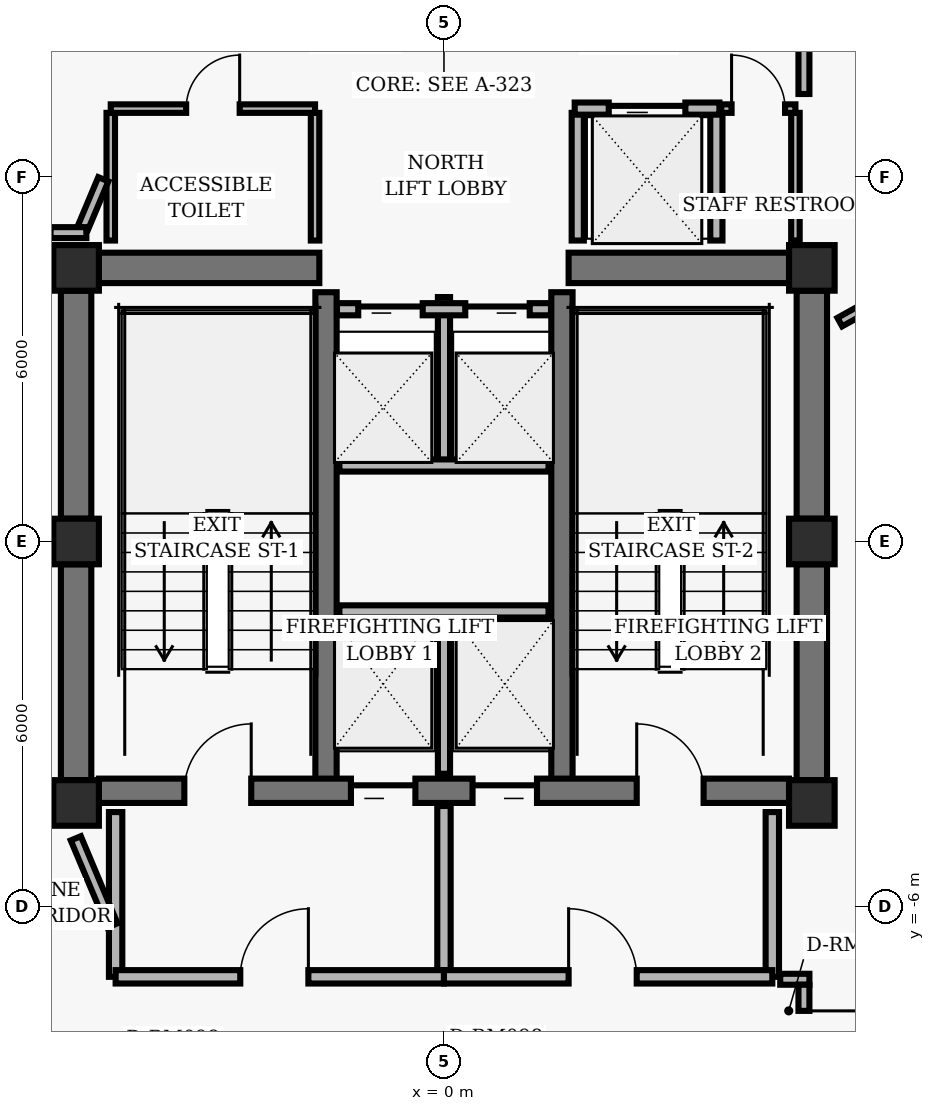
"""IFC4 building model, lengths in metres.
Left out: names, types, materials, properties, quantities, classifications, styles, units other than length and angle.
Written with IfcOpenShell. Run it as: python <this file> out.ifc"""

import sys

from ifc_helpers import new_model, si_unit, direction, frame, frame_2d, origin, origin_2d, place, context, subcontext, project, spatial, rectangle, hollow_rectangle, extrude, element, fill, save


model = new_model("IFC4")
c1 = context("Model", 3, precision=1e-05, world=origin(), true_north=direction((0.0, 1.0)))
c2 = subcontext(c1, "Body", "Model", "MODEL_VIEW")
j1 = project(units=[si_unit("LENGTHUNIT", "METRE"), si_unit("PLANEANGLEUNIT", "RADIAN")], contexts=[c1])
p1 = place(None, origin())
s1 = spatial("IfcSite", under=j1, at=p1, CompositionType="ELEMENT")
p2 = place(p1, origin())
s2 = spatial("IfcBuilding", under=s1, at=p2, CompositionType="ELEMENT")
p3 = place(p2, frame((0.0, 0.0, 175.36)))
s3 = spatial("IfcBuildingStorey", under=s2, at=p3, CompositionType="ELEMENT", Elevation=175.36)
for number, where, z_axis, x_axis in (
    (1, (-6.05, 4.5, 0.0), (0.0, 0.0, 1.0), (1.0, 0.0, 0.0)),
    (2, (6.05, 4.5, 0.0), (0.0, 0.0, 1.0), (1.0, 0.0, 0.0)),
    (3, (-6.05, 0.0, 0.0), (0.0, 0.0, 1.0), (1.0, 0.0, 0.0)),
    (4, (6.05, 0.0, 0.0), (0.0, 0.0, 1.0), (1.0, 0.0, 0.0)),
    (5, (-6.05, -4.3, 0.0), (0.0, 0.0, 1.0), (1.0, 0.0, 0.0)),
    (6, (6.05, -4.3, 0.0), (0.0, 0.0, 1.0), (1.0, 0.0, 0.0)),
):
    element("IfcColumn", number, at=place(p3, frame(where, z_axis=z_axis, x_axis=x_axis)), inside=s3, PredefinedType="COLUMN", context=c2, shape_type="SweptSolid", body=[
        extrude(hollow_rectangle(XDim=0.75, YDim=0.75, WallThickness=0.05, InnerFilletRadius=0.02, OuterFilletRadius=0.04, at=origin_2d()), origin(), (0.0, 0.0, 1.0), 3.04),
    ])
p4 = place(p3, frame((-6.05, 0.375, 0.0), z_axis=(0.0, 0.0, 1.0), x_axis=(0.0, 1.0, 0.0)))
e7 = element("IfcWall", 7, at=p4, inside=s3, PredefinedType="SHEAR", context=c2, shape_type="SweptSolid", body=[
    extrude(rectangle(XDim=3.75, YDim=0.5, at=frame_2d((1.875, 0.0))), origin(), (0.0, 0.0, 1.0), 2.798),
])
p5 = place(p3, frame((-6.05, -3.925, 0.0), z_axis=(0.0, 0.0, 1.0), x_axis=(0.0, 1.0, 0.0)))
e8 = element("IfcWall", 8, at=p5, inside=s3, PredefinedType="SHEAR", context=c2, shape_type="SweptSolid", body=[
    extrude(rectangle(XDim=3.55, YDim=0.5, at=frame_2d((1.775, 0.0))), origin(), (0.0, 0.0, 1.0), 2.798),
])
p6 = place(p3, frame((6.05, 0.375, 0.0), z_axis=(0.0, 0.0, 1.0), x_axis=(0.0, 1.0, 0.0)))
e9 = element("IfcWall", 9, at=p6, inside=s3, PredefinedType="SHEAR", context=c2, shape_type="SweptSolid", body=[
    extrude(rectangle(XDim=3.75, YDim=0.5, at=frame_2d((1.875, 0.0))), origin(), (0.0, 0.0, 1.0), 2.798),
])
p7 = place(p3, frame((6.05, -3.925, 0.0), z_axis=(0.0, 0.0, 1.0), x_axis=(0.0, 1.0, 0.0)))
e10 = element("IfcWall", 10, at=p7, inside=s3, PredefinedType="SHEAR", context=c2, shape_type="SweptSolid", body=[
    extrude(rectangle(XDim=3.55, YDim=0.5, at=frame_2d((1.775, 0.0))), origin(), (0.0, 0.0, 1.0), 2.798),
])
for number, where, z_axis, x_axis in (
    (11, (-1.94, -4.1, 0.0), (0.0, 0.0, 1.0), (0.0, 1.0, 0.0)),
    (12, (1.94, -4.1, 0.0), (0.0, 0.0, 1.0), (0.0, 1.0, 0.0)),
):
    element("IfcWall", number, at=place(p3, frame(where, z_axis=z_axis, x_axis=x_axis)), inside=s3, PredefinedType="SHEAR", context=c2, shape_type="SweptSolid", body=[
        extrude(rectangle(XDim=8.2, YDim=0.35, at=frame_2d((4.1, 0.0))), origin(), (0.0, 0.0, 1.0), 2.798),
    ])
p8 = place(p3, frame((-5.675, -4.1, 0.0), z_axis=(0.0, 0.0, 1.0), x_axis=(1.0, 0.0, 0.0)))
e13 = element("IfcWall", 13, at=p8, inside=s3, PredefinedType="SHEAR", context=c2, shape_type="SweptSolid", body=[
    extrude(rectangle(XDim=11.35, YDim=0.4, at=frame_2d((5.675, 0.0))), origin(), (0.0, 0.0, 1.0), 2.798),
])
p9 = place(p8, frame((1.405, 0.0, 0.0)))
e14 = element("IfcOpeningElement", 14, at=p9, cuts=e13, PredefinedType="OPENING", context=c2, shape_type="SweptSolid", body=[
    extrude(rectangle(XDim=1.1, YDim=2.04, at=frame_2d((0.55, 1.02))), frame((0.0, 0.21, 0.0), z_axis=(0.0, -1.0, 0.0), x_axis=(1.0, 0.0, 0.0)), (0.0, 0.0, 1.0), 0.42),
])
p10 = place(p8, frame((8.845, 0.0, 0.0)))
e15 = element("IfcOpeningElement", 15, at=p10, cuts=e13, PredefinedType="OPENING", context=c2, shape_type="SweptSolid", body=[
    extrude(rectangle(XDim=1.1, YDim=2.04, at=frame_2d((0.55, 1.02))), frame((0.0, 0.21, 0.0), z_axis=(0.0, -1.0, 0.0), x_axis=(1.0, 0.0, 0.0)), (0.0, 0.0, 1.0), 0.42),
])
p11 = place(p8, frame((4.145, 0.0, 0.0)))
e16 = element("IfcOpeningElement", 16, at=p11, cuts=e13, PredefinedType="OPENING", context=c2, shape_type="SweptSolid", body=[
    extrude(rectangle(XDim=1.06, YDim=2.04, at=frame_2d((0.53, 1.02))), frame((0.0, 0.21, 0.0), z_axis=(0.0, -1.0, 0.0), x_axis=(1.0, 0.0, 0.0)), (0.0, 0.0, 1.0), 0.42),
])
p12 = place(p8, frame((6.145, 0.0, 0.0)))
e17 = element("IfcOpeningElement", 17, at=p12, cuts=e13, PredefinedType="OPENING", context=c2, shape_type="SweptSolid", body=[
    extrude(rectangle(XDim=1.06, YDim=2.04, at=frame_2d((0.53, 1.02))), frame((0.0, 0.21, 0.0), z_axis=(0.0, -1.0, 0.0), x_axis=(1.0, 0.0, 0.0)), (0.0, 0.0, 1.0), 0.42),
])
for number, where, z_axis, x_axis in (
    (18, (-5.675, 4.5, 0.0), (0.0, 0.0, 1.0), (1.0, 0.0, 0.0)),
    (19, (2.05, 4.5, 0.0), (0.0, 0.0, 1.0), (1.0, 0.0, 0.0)),
):
    element("IfcWall", number, at=place(p3, frame(where, z_axis=z_axis, x_axis=x_axis)), inside=s3, PredefinedType="SHEAR", context=c2, shape_type="SweptSolid", body=[
        extrude(rectangle(XDim=3.625, YDim=0.5, at=frame_2d((1.812, 0.0))), origin(), (0.0, 0.0, 1.0), 2.798),
    ])
p13 = place(p3, frame((0.0, -3.82, 0.0), z_axis=(0.0, 0.0, 1.0), x_axis=(0.0, 1.0, 0.0)))
e20 = element("IfcWall", 20, at=p13, inside=s3, PredefinedType="PARTITIONING", context=c2, shape_type="SweptSolid", body=[
    extrude(rectangle(XDim=2.67, YDim=0.2, at=frame_2d((1.335, 0.0))), origin(), (0.0, 0.0, 1.0), 2.773),
])
p14 = place(p3, frame((-1.72, -1.15, 0.0), z_axis=(0.0, 0.0, 1.0), x_axis=(1.0, 0.0, 0.0)))
e21 = element("IfcWall", 21, at=p14, inside=s3, PredefinedType="PARTITIONING", context=c2, shape_type="SweptSolid", body=[
    extrude(rectangle(XDim=3.44, YDim=0.2, at=frame_2d((1.72, 0.0))), origin(), (0.0, 0.0, 1.0), 2.773),
])
for number, where, z_axis, x_axis in (
    (22, (-5.4, -7.16, 0.0), (0.0, 0.0, 1.0), (0.0, 1.0, 0.0)),
    (23, (5.4, -7.16, 0.0), (0.0, 0.0, 1.0), (0.0, 1.0, 0.0)),
):
    element("IfcWall", number, at=place(p3, frame(where, z_axis=z_axis, x_axis=x_axis)), inside=s3, PredefinedType="PARTITIONING", context=c2, shape_type="SweptSolid", body=[
        extrude(rectangle(XDim=2.71, YDim=0.22, at=frame_2d((1.355, 0.0))), origin(), (0.0, 0.0, 1.0), 2.773),
    ])
p15 = place(p3, frame((0.0, -7.16, 0.0), z_axis=(0.0, 0.0, 1.0), x_axis=(0.0, 1.0, 0.0)))
e24 = element("IfcWall", 24, at=p15, inside=s3, PredefinedType="PARTITIONING", context=c2, shape_type="SweptSolid", body=[
    extrude(rectangle(XDim=2.81, YDim=0.22, at=frame_2d((1.405, 0.0))), origin(), (0.0, 0.0, 1.0), 2.773),
])
p16 = place(p3, frame((-5.4, -7.16, 0.0), z_axis=(0.0, 0.0, 1.0), x_axis=(1.0, 0.0, 0.0)))
e25 = element("IfcWall", 25, at=p16, inside=s3, PredefinedType="PARTITIONING", context=c2, shape_type="SweptSolid", body=[
    extrude(rectangle(XDim=5.4, YDim=0.22, at=frame_2d((2.7, 0.0))), origin(), (0.0, 0.0, 1.0), 2.395),
])
p17 = place(p16, frame((2.05, 0.0, 0.0)))
e26 = element("IfcOpeningElement", 26, at=p17, cuts=e25, PredefinedType="OPENING", context=c2, shape_type="SweptSolid", body=[
    extrude(rectangle(XDim=1.12, YDim=2.02, at=frame_2d((0.56, 1.01))), frame((0.0, 0.12, 0.0), z_axis=(0.0, -1.0, 0.0), x_axis=(1.0, 0.0, 0.0)), (0.0, 0.0, 1.0), 0.24),
])
p18 = place(p3, frame((0.0, -7.16, 0.0), z_axis=(0.0, 0.0, 1.0), x_axis=(1.0, 0.0, 0.0)))
e27 = element("IfcWall", 27, at=p18, inside=s3, PredefinedType="PARTITIONING", context=c2, shape_type="SweptSolid", body=[
    extrude(rectangle(XDim=5.4, YDim=0.22, at=frame_2d((2.7, 0.0))), origin(), (0.0, 0.0, 1.0), 2.395),
])
p19 = place(p18, frame((2.05, 0.0, 0.0)))
e28 = element("IfcOpeningElement", 28, at=p19, cuts=e27, PredefinedType="OPENING", context=c2, shape_type="SweptSolid", body=[
    extrude(rectangle(XDim=1.12, YDim=2.02, at=frame_2d((0.56, 1.01))), frame((0.0, 0.12, 0.0), z_axis=(0.0, -1.0, 0.0), x_axis=(1.0, 0.0, 0.0)), (0.0, 0.0, 1.0), 0.24),
])
p20 = place(p3, frame((0.0, 1.25, 0.0), z_axis=(0.0, 0.0, 1.0), x_axis=(0.0, 1.0, 0.0)))
e29 = element("IfcWall", 29, at=p20, inside=s3, PredefinedType="PARTITIONING", context=c2, shape_type="SweptSolid", body=[
    extrude(rectangle(XDim=2.77, YDim=0.2, at=frame_2d((1.385, 0.0))), origin(), (0.0, 0.0, 1.0), 2.773),
])
p21 = place(p3, frame((-1.72, 1.25, 0.0), z_axis=(0.0, 0.0, 1.0), x_axis=(1.0, 0.0, 0.0)))
e30 = element("IfcWall", 30, at=p21, inside=s3, PredefinedType="PARTITIONING", context=c2, shape_type="SweptSolid", body=[
    extrude(rectangle(XDim=3.44, YDim=0.2, at=frame_2d((1.72, 0.0))), origin(), (0.0, 0.0, 1.0), 2.773),
])
p22 = place(p3, frame((-1.76, 3.82, 0.0), z_axis=(0.0, 0.0, 1.0), x_axis=(1.0, 0.0, 0.0)))
e31 = element("IfcWall", 31, at=p22, inside=s3, PredefinedType="PARTITIONING", context=c2, shape_type="SweptSolid", body=[
    extrude(rectangle(XDim=3.52, YDim=0.2, at=frame_2d((1.76, 0.0))), origin(), (0.0, 0.0, 1.0), 2.773),
])
p23 = place(p22, frame((0.35, 0.0, 0.0)))
e32 = element("IfcOpeningElement", 32, at=p23, cuts=e31, PredefinedType="OPENING", context=c2, shape_type="SweptSolid", body=[
    extrude(rectangle(XDim=1.06, YDim=2.04, at=frame_2d((0.53, 1.02))), frame((0.0, 0.11, 0.0), z_axis=(0.0, -1.0, 0.0), x_axis=(1.0, 0.0, 0.0)), (0.0, 0.0, 1.0), 0.22),
])
p24 = place(p22, frame((2.11, 0.0, 0.0)))
e33 = element("IfcOpeningElement", 33, at=p24, cuts=e31, PredefinedType="OPENING", context=c2, shape_type="SweptSolid", body=[
    extrude(rectangle(XDim=1.06, YDim=2.04, at=frame_2d((0.53, 1.02))), frame((0.0, 0.11, 0.0), z_axis=(0.0, -1.0, 0.0), x_axis=(1.0, 0.0, 0.0)), (0.0, 0.0, 1.0), 0.22),
])
for number, where, z_axis, x_axis in (
    (34, (2.2, 4.95, 0.0), (0.0, 0.0, 1.0), (0.0, 1.0, 0.0)),
    (35, (4.48, 4.95, 0.0), (0.0, 0.0, 1.0), (0.0, 1.0, 0.0)),
):
    element("IfcWall", number, at=place(p3, frame(where, z_axis=z_axis, x_axis=x_axis)), inside=s3, PredefinedType="PARTITIONING", context=c2, shape_type="SweptSolid", body=[
        extrude(rectangle(XDim=2.1, YDim=0.2, at=frame_2d((1.05, 0.0))), origin(), (0.0, 0.0, 1.0), 2.773),
    ])
p25 = place(p3, frame((2.15, 7.12, 0.0), z_axis=(0.0, 0.0, 1.0), x_axis=(1.0, 0.0, 0.0)))
e36 = element("IfcWall", 36, at=p25, inside=s3, PredefinedType="PARTITIONING", context=c2, shape_type="SweptSolid", body=[
    extrude(rectangle(XDim=2.38, YDim=0.2, at=frame_2d((1.19, 0.0))), origin(), (0.0, 0.0, 1.0), 2.773),
])
p26 = place(p25, frame((0.56, 0.0, 0.0)))
e37 = element("IfcOpeningElement", 37, at=p26, cuts=e36, PredefinedType="OPENING", context=c2, shape_type="SweptSolid", body=[
    extrude(rectangle(XDim=1.26, YDim=2.06, at=frame_2d((0.63, 1.03))), frame((0.0, 0.11, 0.0), z_axis=(0.0, -1.0, 0.0), x_axis=(1.0, 0.0, 0.0)), (0.0, 0.0, 1.0), 0.22),
])
for number, where, z_axis, x_axis in (
    (38, (-5.48, 4.95, 0.0), (0.0, 0.0, 1.0), (0.0, 1.0, 0.0)),
    (39, (-2.12, 4.95, 0.0), (0.0, 0.0, 1.0), (0.0, 1.0, 0.0)),
):
    element("IfcWall", number, at=place(p3, frame(where, z_axis=z_axis, x_axis=x_axis)), inside=s3, PredefinedType="PARTITIONING", context=c2, shape_type="SweptSolid", body=[
        extrude(rectangle(XDim=2.1, YDim=0.14, at=frame_2d((1.05, 0.0))), origin(), (0.0, 0.0, 1.0), 2.773),
    ])
p27 = place(p3, frame((-5.48, 7.12, 0.0), z_axis=(0.0, 0.0, 1.0), x_axis=(1.0, 0.0, 0.0)))
e40 = element("IfcWall", 40, at=p27, inside=s3, PredefinedType="PARTITIONING", context=c2, shape_type="SweptSolid", body=[
    extrude(rectangle(XDim=3.36, YDim=0.14, at=frame_2d((1.68, 0.0))), origin(), (0.0, 0.0, 1.0), 2.773),
])
p28 = place(p27, frame((1.24, 0.0, 0.0)))
e41 = element("IfcOpeningElement", 41, at=p28, cuts=e40, PredefinedType="OPENING", context=c2, shape_type="SweptSolid", body=[
    extrude(rectangle(XDim=0.88, YDim=2.02, at=frame_2d((0.44, 1.01))), frame((0.0, 0.08, 0.0), z_axis=(0.0, -1.0, 0.0), x_axis=(1.0, 0.0, 0.0)), (0.0, 0.0, 1.0), 0.16),
])
p29 = place(p3, frame((5.78, 4.95, 0.0), z_axis=(0.0, 0.0, 1.0), x_axis=(0.0, 1.0, 0.0)))
e42 = element("IfcWall", 42, at=p29, inside=s3, PredefinedType="PARTITIONING", context=c2, shape_type="SweptSolid", body=[
    extrude(rectangle(XDim=2.1, YDim=0.14, at=frame_2d((1.05, 0.0))), origin(), (0.0, 0.0, 1.0), 2.253),
])
p30 = place(p3, frame((4.56, 7.12, 0.0), z_axis=(0.0, 0.0, 1.0), x_axis=(1.0, 0.0, 0.0)))
e43 = element("IfcWall", 43, at=p30, inside=s3, PredefinedType="PARTITIONING", context=c2, shape_type="SweptSolid", body=[
    extrude(rectangle(XDim=1.22, YDim=0.14, at=frame_2d((0.61, 0.0))), origin(), (0.0, 0.0, 1.0), 2.773),
])
p31 = place(p30, frame((0.17, 0.0, 0.0)))
e44 = element("IfcOpeningElement", 44, at=p31, cuts=e43, PredefinedType="OPENING", context=c2, shape_type="SweptSolid", body=[
    extrude(rectangle(XDim=0.88, YDim=2.02, at=frame_2d((0.44, 1.01))), frame((0.0, 0.08, 0.0), z_axis=(0.0, -1.0, 0.0), x_axis=(1.0, 0.0, 0.0)), (0.0, 0.0, 1.0), 0.16),
])
p32 = place(p3, frame((5.92, 9.16, 0.0), z_axis=(0.0, 0.0, 1.0), x_axis=(0.0, -1.0, 0.0)))
e45 = element("IfcWall", 45, at=p32, inside=s3, PredefinedType="PARTITIONING", context=c2, shape_type="SweptSolid", body=[
    extrude(rectangle(XDim=1.8, YDim=0.18, at=frame_2d((0.9, 0.0))), origin(), (0.0, 0.0, 1.0), 2.253),
])
p33 = place(p3, frame((-5.602, 5.958, 0.0), z_axis=(0.0, 0.0, 1.0), x_axis=(-0.387588639363, -0.921832439566, 0.0)))
e46 = element("IfcWall", 46, at=p33, inside=s3, PredefinedType="PARTITIONING", context=c2, shape_type="SweptSolid", body=[
    extrude(rectangle(XDim=0.862, YDim=0.18, at=frame_2d((0.431, 0.0))), origin(), (0.0, 0.0, 1.0), 2.773),
])
p34 = place(p3, frame((-5.881, 5.08, 0.0), z_axis=(0.0, 0.0, 1.0), x_axis=(-1.0, 0.0, 0.0)))
e47 = element("IfcWall", 47, at=p34, inside=s3, PredefinedType="PARTITIONING", context=c2, shape_type="SweptSolid", body=[
    extrude(rectangle(XDim=0.589, YDim=0.18, at=frame_2d((0.294, 0.0))), origin(), (0.0, 0.0, 1.0), 2.773),
])
p35 = place(p3, frame((-6.055, -4.882, 0.0), z_axis=(0.0, 0.0, 1.0), x_axis=(0.387579540458, -0.921836265189, 0.0)))
e48 = element("IfcWall", 48, at=p35, inside=s3, PredefinedType="PARTITIONING", context=c2, shape_type="SweptSolid", body=[
    extrude(rectangle(XDim=1.555, YDim=0.18, at=frame_2d((0.777, 0.0))), origin(), (0.0, 0.0, 1.0), 2.773),
])
p36 = place(p3, frame((5.53, -7.2, 0.0), z_axis=(0.0, 0.0, 1.0), x_axis=(1.0, 0.0, 0.0)))
e49 = element("IfcWall", 49, at=p36, inside=s3, PredefinedType="PARTITIONING", context=c2, shape_type="SweptSolid", body=[
    extrude(rectangle(XDim=0.48, YDim=0.18, at=frame_2d((0.24, 0.0))), origin(), (0.0, 0.0, 1.0), 2.773),
])
p37 = place(p3, frame((5.92, -7.29, 0.0), z_axis=(0.0, 0.0, 1.0), x_axis=(0.0, -1.0, 0.0)))
e50 = element("IfcWall", 50, at=p37, inside=s3, PredefinedType="PARTITIONING", context=c2, shape_type="SweptSolid", body=[
    extrude(rectangle(XDim=1.82, YDim=0.18, at=frame_2d((0.91, 0.0))), origin(), (0.0, 0.0, 1.0), 2.773),
])
p38 = place(p37, frame((0.43, 0.0, 0.0)))
e51 = element("IfcOpeningElement", 51, at=p38, cuts=e50, PredefinedType="OPENING", context=c2, shape_type="SweptSolid", body=[
    extrude(rectangle(XDim=0.96, YDim=2.02, at=frame_2d((0.48, 1.01))), frame((0.0, 0.1, 0.0), z_axis=(0.0, -1.0, 0.0), x_axis=(1.0, 0.0, 0.0)), (0.0, 0.0, 1.0), 0.2),
])
p39 = place(p3, frame((6.51, 3.609, 0.0), z_axis=(0.0, 0.0, 1.0), x_axis=(0.874634801292, 0.484782388675, 0.0)))
e52 = element("IfcWall", 52, at=p39, inside=s3, PredefinedType="PARTITIONING", context=c2, shape_type="SweptSolid", body=[
    extrude(rectangle(XDim=5.879, YDim=0.16, at=frame_2d((2.939, 0.0))), origin(), (0.0, 0.0, 1.0), 2.773),
])
p40 = place(p9, origin())
e53 = element("IfcDoor", 53, at=p40, inside=s3, OperationType="SINGLE_SWING_RIGHT", PredefinedType="DOOR", context=c2, shape_type="SweptSolid", body=[
    extrude(rectangle(XDim=1.1, YDim=2.04, at=frame_2d((0.55, 1.02))), frame((0.0, 0.025, 0.0), z_axis=(0.0, -1.0, 0.0), x_axis=(1.0, 0.0, 0.0)), (0.0, 0.0, 1.0), 0.05),
])
fill(e14, e53)
p41 = place(p10, origin())
e54 = element("IfcDoor", 54, at=p41, inside=s3, OperationType="SINGLE_SWING_LEFT", PredefinedType="DOOR", context=c2, shape_type="SweptSolid", body=[
    extrude(rectangle(XDim=1.1, YDim=2.04, at=frame_2d((0.55, 1.02))), frame((0.0, 0.025, 0.0), z_axis=(0.0, -1.0, 0.0), x_axis=(1.0, 0.0, 0.0)), (0.0, 0.0, 1.0), 0.05),
])
fill(e15, e54)
p42 = place(p11, origin())
e55 = element("IfcDoor", 55, at=p42, inside=s3, OperationType="SLIDING_TO_LEFT", PredefinedType="DOOR", context=c2, shape_type="SweptSolid", body=[
    extrude(rectangle(XDim=1.06, YDim=2.04, at=frame_2d((0.53, 1.02))), frame((0.0, 0.025, 0.0), z_axis=(0.0, -1.0, 0.0), x_axis=(1.0, 0.0, 0.0)), (0.0, 0.0, 1.0), 0.05),
])
fill(e16, e55)
p43 = place(p12, origin())
e56 = element("IfcDoor", 56, at=p43, inside=s3, OperationType="SLIDING_TO_RIGHT", PredefinedType="DOOR", context=c2, shape_type="SweptSolid", body=[
    extrude(rectangle(XDim=1.06, YDim=2.04, at=frame_2d((0.53, 1.02))), frame((0.0, 0.025, 0.0), z_axis=(0.0, -1.0, 0.0), x_axis=(1.0, 0.0, 0.0)), (0.0, 0.0, 1.0), 0.05),
])
fill(e17, e56)
p44 = place(p17, origin())
e57 = element("IfcDoor", 57, at=p44, inside=s3, OperationType="SINGLE_SWING_RIGHT", PredefinedType="DOOR", context=c2, shape_type="SweptSolid", body=[
    extrude(rectangle(XDim=1.12, YDim=2.02, at=frame_2d((0.56, 1.01))), frame((0.0, 0.025, 0.0), z_axis=(0.0, -1.0, 0.0), x_axis=(1.0, 0.0, 0.0)), (0.0, 0.0, 1.0), 0.05),
])
fill(e26, e57)
p45 = place(p19, origin())
e58 = element("IfcDoor", 58, at=p45, inside=s3, OperationType="SINGLE_SWING_LEFT", PredefinedType="DOOR", context=c2, shape_type="SweptSolid", body=[
    extrude(rectangle(XDim=1.12, YDim=2.02, at=frame_2d((0.56, 1.01))), frame((0.0, 0.025, 0.0), z_axis=(0.0, -1.0, 0.0), x_axis=(1.0, 0.0, 0.0)), (0.0, 0.0, 1.0), 0.05),
])
fill(e28, e58)
p46 = place(p23, origin())
e59 = element("IfcDoor", 59, at=p46, inside=s3, OperationType="SLIDING_TO_LEFT", PredefinedType="DOOR", context=c2, shape_type="SweptSolid", body=[
    extrude(rectangle(XDim=1.06, YDim=2.04, at=frame_2d((0.53, 1.02))), frame((0.0, 0.025, 0.0), z_axis=(0.0, -1.0, 0.0), x_axis=(1.0, 0.0, 0.0)), (0.0, 0.0, 1.0), 0.05),
])
fill(e32, e59)
p47 = place(p24, origin())
e60 = element("IfcDoor", 60, at=p47, inside=s3, OperationType="SLIDING_TO_RIGHT", PredefinedType="DOOR", context=c2, shape_type="SweptSolid", body=[
    extrude(rectangle(XDim=1.06, YDim=2.04, at=frame_2d((0.53, 1.02))), frame((0.0, 0.025, 0.0), z_axis=(0.0, -1.0, 0.0), x_axis=(1.0, 0.0, 0.0)), (0.0, 0.0, 1.0), 0.05),
])
fill(e33, e60)
p48 = place(p26, origin())
e61 = element("IfcDoor", 61, at=p48, inside=s3, OperationType="SLIDING_TO_LEFT", PredefinedType="DOOR", context=c2, shape_type="SweptSolid", body=[
    extrude(rectangle(XDim=1.26, YDim=2.06, at=frame_2d((0.63, 1.03))), frame((0.0, 0.025, 0.0), z_axis=(0.0, -1.0, 0.0), x_axis=(1.0, 0.0, 0.0)), (0.0, 0.0, 1.0), 0.05),
])
fill(e37, e61)
p49 = place(p28, origin())
e62 = element("IfcDoor", 62, at=p49, inside=s3, OperationType="SINGLE_SWING_RIGHT", PredefinedType="DOOR", context=c2, shape_type="SweptSolid", body=[
    extrude(rectangle(XDim=0.88, YDim=2.02, at=frame_2d((0.44, 1.01))), frame((0.0, 0.025, 0.0), z_axis=(0.0, -1.0, 0.0), x_axis=(1.0, 0.0, 0.0)), (0.0, 0.0, 1.0), 0.05),
])
fill(e41, e62)
p50 = place(p31, origin())
e63 = element("IfcDoor", 63, at=p50, inside=s3, OperationType="SINGLE_SWING_LEFT", PredefinedType="DOOR", context=c2, shape_type="SweptSolid", body=[
    extrude(rectangle(XDim=0.88, YDim=2.02, at=frame_2d((0.44, 1.01))), frame((0.0, 0.025, 0.0), z_axis=(0.0, -1.0, 0.0), x_axis=(1.0, 0.0, 0.0)), (0.0, 0.0, 1.0), 0.05),
])
fill(e44, e63)
p51 = place(p38, origin())
e64 = element("IfcDoor", 64, at=p51, inside=s3, OperationType="SINGLE_SWING_LEFT", PredefinedType="DOOR", context=c2, shape_type="SweptSolid", body=[
    extrude(rectangle(XDim=0.96, YDim=2.02, at=frame_2d((0.48, 1.01))), frame((0.0, 0.025, 0.0), z_axis=(0.0, -1.0, 0.0), x_axis=(1.0, 0.0, 0.0)), (0.0, 0.0, 1.0), 0.05),
])
fill(e51, e64)
save(model, sys.argv[1])
